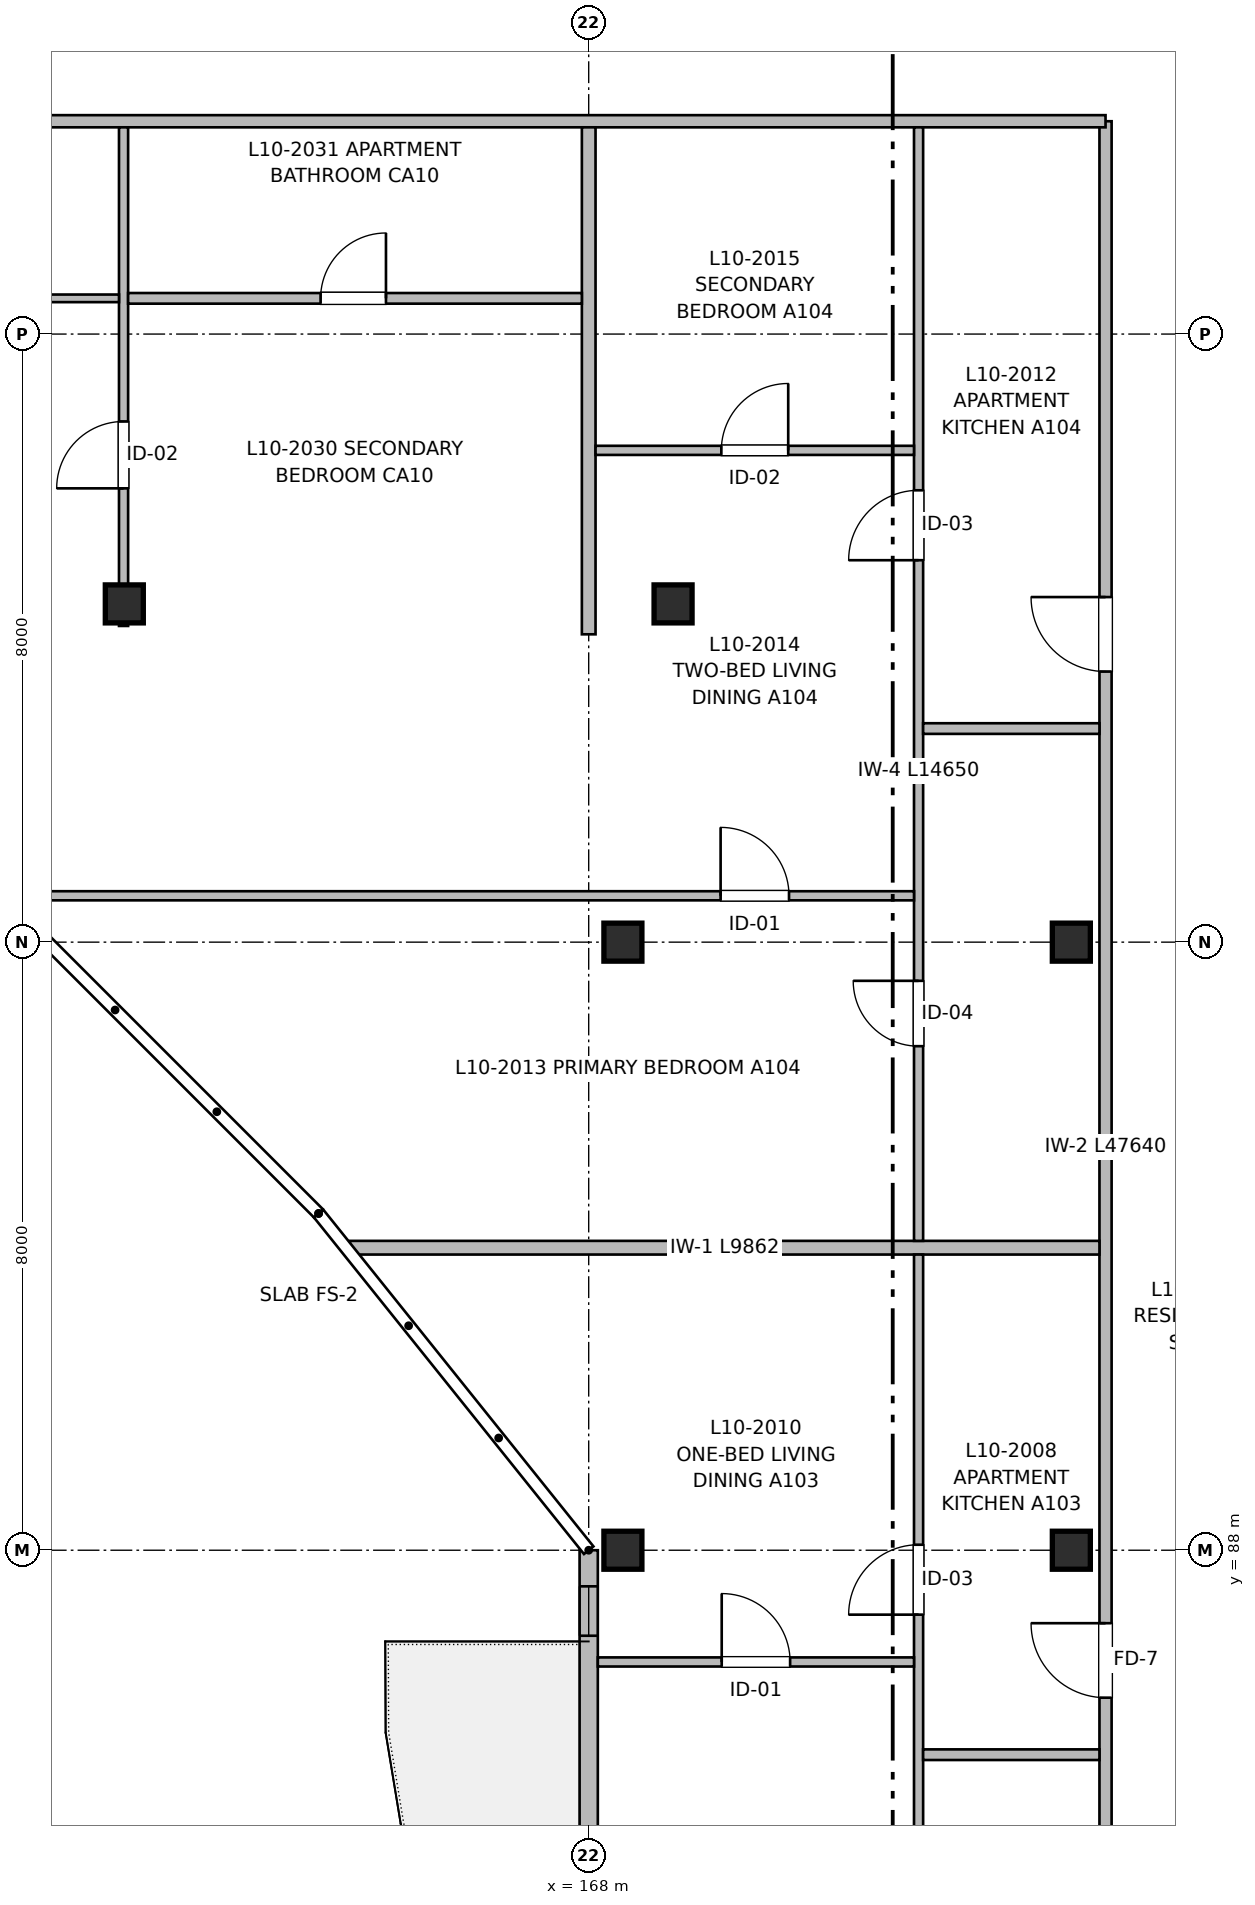
"""IFC4 building model, lengths in metres.
Left out: names, types, materials, properties, quantities, classifications, styles, units other than length and angle.
Written with IfcOpenShell. Run it as: python <this file> out.ifc"""

import sys

from ifc_helpers import new_model, si_unit, direction, frame, frame_2d, origin, origin_2d, place, context, subcontext, project, spatial, rectangle, extrude, element, fill, save


model = new_model("IFC4")
c1 = context("Model", 3, precision=1e-05, world=origin(), true_north=direction((0.0, 1.0)))
c2 = subcontext(c1, "Body", "Model", "MODEL_VIEW")
j1 = project(units=[si_unit("LENGTHUNIT", "METRE"), si_unit("PLANEANGLEUNIT", "RADIAN")], contexts=[c1])
p1 = place(None, origin())
s1 = spatial("IfcSite", under=j1, at=p1, CompositionType="ELEMENT")
p2 = place(p1, origin())
s2 = spatial("IfcBuilding", under=s1, at=p2, CompositionType="ELEMENT")
p3 = place(p2, frame((0.0, 0.0, 32.96)))
s3 = spatial("IfcBuildingStorey", under=s2, at=p3, CompositionType="ELEMENT", Elevation=32.96)
for number, where, z_axis, x_axis in (
    (1, (161.89, 100.45, 0.0), (0.0, 0.0, 1.0), (1.0, 0.0, 0.0)),
    (2, (168.45, 88.0, 0.0), (0.0, 0.0, 1.0), (1.0, 0.0, 0.0)),
    (3, (168.45, 96.0, 0.0), (0.0, 0.0, 1.0), (1.0, 0.0, 0.0)),
    (4, (169.11, 100.45, 0.0), (0.0, 0.0, 1.0), (1.0, 0.0, 0.0)),
    (5, (174.35, 88.0, 0.0), (0.0, 0.0, 1.0), (1.0, 0.0, 0.0)),
    (6, (174.35, 96.0, 0.0), (0.0, 0.0, 1.0), (1.0, 0.0, 0.0)),
):
    element("IfcColumn", number, at=place(p3, frame(where, z_axis=z_axis, x_axis=x_axis)), inside=s3, PredefinedType="COLUMN", context=c2, shape_type="SweptSolid", body=[
        extrude(rectangle(XDim=0.5, YDim=0.5, at=origin_2d()), origin(), (0.0, 0.0, 1.0), 3.2),
    ])
p4 = place(p3, frame((168.0, 59.0, 0.0), z_axis=(0.0, 0.0, 1.0), x_axis=(0.0, 1.0, 0.0)))
e7 = element("IfcWall", 7, at=p4, inside=s3, PredefinedType="SOLIDWALL", context=c2, shape_type="SweptSolid", body=[
    extrude(rectangle(XDim=29.0, YDim=0.24, at=frame_2d((14.5, 0.0))), origin(), (0.0, 0.0, 1.0), 2.98),
])
p5 = place(p4, frame((3.033, 0.0, 0.0)))
e8 = element("IfcOpeningElement", 8, at=p5, cuts=e7, PredefinedType="OPENING", context=c2, shape_type="SweptSolid", body=[
    extrude(rectangle(XDim=1.2, YDim=2.2, at=frame_2d((0.6, 1.1))), frame((0.0, 0.13, 0.0), z_axis=(0.0, -1.0, 0.0), x_axis=(1.0, 0.0, 0.0)), (0.0, 0.0, 1.0), 0.26),
])
p6 = place(p4, frame((6.133, 0.0, 0.82)))
e9 = element("IfcOpeningElement", 9, at=p6, cuts=e7, PredefinedType="OPENING", context=c2, shape_type="SweptSolid", body=[
    extrude(rectangle(XDim=1.5, YDim=1.4, at=frame_2d((0.75, 0.7))), frame((0.0, 0.13, 0.0), z_axis=(0.0, -1.0, 0.0), x_axis=(1.0, 0.0, 0.0)), (0.0, 0.0, 1.0), 0.26),
])
p7 = place(p4, frame((13.9, 0.0, 0.9)))
e10 = element("IfcOpeningElement", 10, at=p7, cuts=e7, PredefinedType="OPENING", context=c2, shape_type="SweptSolid", body=[
    extrude(rectangle(XDim=1.2, YDim=1.05, at=frame_2d((0.6, 0.525))), frame((0.0, 0.13, 0.0), z_axis=(0.0, -1.0, 0.0), x_axis=(1.0, 0.0, 0.0)), (0.0, 0.0, 1.0), 0.26),
])
p8 = place(p4, frame((23.842, 0.0, 0.9)))
e11 = element("IfcOpeningElement", 11, at=p8, cuts=e7, PredefinedType="OPENING", context=c2, shape_type="SweptSolid", body=[
    extrude(rectangle(XDim=0.65, YDim=0.95, at=frame_2d((0.325, 0.475))), frame((0.0, 0.13, 0.0), z_axis=(0.0, -1.0, 0.0), x_axis=(1.0, 0.0, 0.0)), (0.0, 0.0, 1.0), 0.26),
])
p9 = place(p4, frame((17.535, 0.0, 0.82)))
e12 = element("IfcOpeningElement", 12, at=p9, cuts=e7, PredefinedType="OPENING", context=c2, shape_type="SweptSolid", body=[
    extrude(rectangle(XDim=1.5, YDim=1.4, at=frame_2d((0.75, 0.7))), frame((0.0, 0.13, 0.0), z_axis=(0.0, -1.0, 0.0), x_axis=(1.0, 0.0, 0.0)), (0.0, 0.0, 1.0), 0.26),
])
p10 = place(p4, frame((27.875, 0.0, 0.9)))
e13 = element("IfcOpeningElement", 13, at=p10, cuts=e7, PredefinedType="OPENING", context=c2, shape_type="SweptSolid", body=[
    extrude(rectangle(XDim=0.65, YDim=0.95, at=frame_2d((0.325, 0.475))), frame((0.0, 0.13, 0.0), z_axis=(0.0, -1.0, 0.0), x_axis=(1.0, 0.0, 0.0)), (0.0, 0.0, 1.0), 0.26),
])
p11 = place(p3, frame((174.8, 59.16, 0.0), z_axis=(0.0, 0.0, 1.0), x_axis=(0.0, 1.0, 0.0)))
e14 = element("IfcWall", 14, at=p11, inside=s3, PredefinedType="PARTITIONING", context=c2, shape_type="SweptSolid", body=[
    extrude(rectangle(XDim=47.64, YDim=0.16, at=frame_2d((23.82, 0.0))), origin(), (0.0, 0.0, 1.0), 2.935),
])
p12 = place(p11, frame((5.7, 0.0, 0.0)))
e15 = element("IfcOpeningElement", 15, at=p12, cuts=e14, PredefinedType="OPENING", context=c2, shape_type="SweptSolid", body=[
    extrude(rectangle(XDim=0.98, YDim=2.15, at=frame_2d((0.49, 1.075))), frame((0.0, 0.09, 0.0), z_axis=(0.0, -1.0, 0.0), x_axis=(1.0, 0.0, 0.0)), (0.0, 0.0, 1.0), 0.18),
])
p13 = place(p11, frame((15.56, 0.0, 0.0)))
e16 = element("IfcOpeningElement", 16, at=p13, cuts=e14, PredefinedType="OPENING", context=c2, shape_type="SweptSolid", body=[
    extrude(rectangle(XDim=0.98, YDim=2.15, at=frame_2d((0.49, 1.075))), frame((0.0, 0.09, 0.0), z_axis=(0.0, -1.0, 0.0), x_axis=(1.0, 0.0, 0.0)), (0.0, 0.0, 1.0), 0.18),
])
p14 = place(p11, frame((26.9, 0.0, 0.0)))
e17 = element("IfcOpeningElement", 17, at=p14, cuts=e14, PredefinedType="OPENING", context=c2, shape_type="SweptSolid", body=[
    extrude(rectangle(XDim=0.98, YDim=2.15, at=frame_2d((0.49, 1.075))), frame((0.0, 0.09, 0.0), z_axis=(0.0, -1.0, 0.0), x_axis=(1.0, 0.0, 0.0)), (0.0, 0.0, 1.0), 0.18),
])
p15 = place(p11, frame((40.4, 0.0, 0.0)))
e18 = element("IfcOpeningElement", 18, at=p15, cuts=e14, PredefinedType="OPENING", context=c2, shape_type="SweptSolid", body=[
    extrude(rectangle(XDim=0.98, YDim=2.15, at=frame_2d((0.49, 1.075))), frame((0.0, 0.09, 0.0), z_axis=(0.0, -1.0, 0.0), x_axis=(1.0, 0.0, 0.0)), (0.0, 0.0, 1.0), 0.18),
])
p16 = place(p3, frame((147.16, 106.8, 0.0), z_axis=(0.0, 0.0, 1.0), x_axis=(1.0, 0.0, 0.0)))
e19 = element("IfcWall", 19, at=p16, inside=s3, PredefinedType="PARTITIONING", context=c2, shape_type="SweptSolid", body=[
    extrude(rectangle(XDim=27.64, YDim=0.16, at=frame_2d((13.82, 0.0))), origin(), (0.0, 0.0, 1.0), 2.935),
])
p17 = place(p16, frame((3.515, 0.0, 0.0)))
e20 = element("IfcOpeningElement", 20, at=p17, cuts=e19, PredefinedType="OPENING", context=c2, shape_type="SweptSolid", body=[
    extrude(rectangle(XDim=1.05, YDim=2.15, at=frame_2d((0.525, 1.075))), frame((0.0, 0.09, 0.0), z_axis=(0.0, -1.0, 0.0), x_axis=(1.0, 0.0, 0.0)), (0.0, 0.0, 1.0), 0.18),
])
p18 = place(p16, frame((10.69, 0.0, 0.0)))
e21 = element("IfcOpeningElement", 21, at=p18, cuts=e19, PredefinedType="OPENING", context=c2, shape_type="SweptSolid", body=[
    extrude(rectangle(XDim=0.98, YDim=2.15, at=frame_2d((0.49, 1.075))), frame((0.0, 0.09, 0.0), z_axis=(0.0, -1.0, 0.0), x_axis=(1.0, 0.0, 0.0)), (0.0, 0.0, 1.0), 0.18),
])
p19 = place(p3, frame((168.0, 100.05, 0.0), z_axis=(0.0, 0.0, 1.0), x_axis=(0.0, 1.0, 0.0)))
e22 = element("IfcWall", 22, at=p19, inside=s3, PredefinedType="PARTITIONING", context=c2, shape_type="SweptSolid", body=[
    extrude(rectangle(XDim=6.67, YDim=0.18, at=frame_2d((3.335, 0.0))), origin(), (0.0, 0.0, 1.0), 2.935),
])
p20 = place(p3, frame((164.858, 91.98, 0.0), z_axis=(0.0, 0.0, 1.0), x_axis=(1.0, 0.0, 0.0)))
e23 = element("IfcWall", 23, at=p20, inside=s3, PredefinedType="PARTITIONING", context=c2, shape_type="SweptSolid", body=[
    extrude(rectangle(XDim=9.862, YDim=0.18, at=frame_2d((4.931, 0.0))), origin(), (0.0, 0.0, 1.0), 2.935),
])
p21 = place(p3, frame((172.34, 79.7, 0.0), z_axis=(0.0, 0.0, 1.0), x_axis=(0.0, 1.0, 0.0)))
e24 = element("IfcWall", 24, at=p21, inside=s3, PredefinedType="PARTITIONING", context=c2, shape_type="SweptSolid", body=[
    extrude(rectangle(XDim=12.19, YDim=0.12, at=frame_2d((6.095, 0.0))), origin(), (0.0, 0.0, 1.0), 2.935),
])
p22 = place(p21, frame((2.132, 0.0, 0.0)))
e25 = element("IfcOpeningElement", 25, at=p22, cuts=e24, PredefinedType="OPENING", context=c2, shape_type="SweptSolid", body=[
    extrude(rectangle(XDim=0.86, YDim=2.1, at=frame_2d((0.43, 1.05))), frame((0.0, 0.07, 0.0), z_axis=(0.0, -1.0, 0.0), x_axis=(1.0, 0.0, 0.0)), (0.0, 0.0, 1.0), 0.14),
])
p23 = place(p21, frame((7.452, 0.0, 0.0)))
e26 = element("IfcOpeningElement", 26, at=p23, cuts=e24, PredefinedType="OPENING", context=c2, shape_type="SweptSolid", body=[
    extrude(rectangle(XDim=0.92, YDim=2.1, at=frame_2d((0.46, 1.05))), frame((0.0, 0.07, 0.0), z_axis=(0.0, -1.0, 0.0), x_axis=(1.0, 0.0, 0.0)), (0.0, 0.0, 1.0), 0.14),
])
p24 = place(p3, frame((172.4, 85.31, 0.0), z_axis=(0.0, 0.0, 1.0), x_axis=(1.0, 0.0, 0.0)))
e27 = element("IfcWall", 27, at=p24, inside=s3, PredefinedType="PARTITIONING", context=c2, shape_type="SweptSolid", body=[
    extrude(rectangle(XDim=2.32, YDim=0.14, at=frame_2d((1.16, 0.0))), origin(), (0.0, 0.0, 1.0), 2.935),
])
p25 = place(p3, frame((168.12, 86.53, 0.0), z_axis=(0.0, 0.0, 1.0), x_axis=(1.0, 0.0, 0.0)))
e28 = element("IfcWall", 28, at=p25, inside=s3, PredefinedType="PARTITIONING", context=c2, shape_type="SweptSolid", body=[
    extrude(rectangle(XDim=4.16, YDim=0.12, at=frame_2d((2.08, 0.0))), origin(), (0.0, 0.0, 1.0), 2.935),
])
p26 = place(p25, frame((1.63, 0.0, 0.0)))
e29 = element("IfcOpeningElement", 29, at=p26, cuts=e28, PredefinedType="OPENING", context=c2, shape_type="SweptSolid", body=[
    extrude(rectangle(XDim=0.9, YDim=2.1, at=frame_2d((0.45, 1.05))), frame((0.0, 0.07, 0.0), z_axis=(0.0, -1.0, 0.0), x_axis=(1.0, 0.0, 0.0)), (0.0, 0.0, 1.0), 0.14),
])
p27 = place(p3, frame((172.34, 92.07, 0.0), z_axis=(0.0, 0.0, 1.0), x_axis=(0.0, 1.0, 0.0)))
e30 = element("IfcWall", 30, at=p27, inside=s3, PredefinedType="PARTITIONING", context=c2, shape_type="SweptSolid", body=[
    extrude(rectangle(XDim=14.65, YDim=0.12, at=frame_2d((7.325, 0.0))), origin(), (0.0, 0.0, 1.0), 2.935),
])
p28 = place(p27, frame((2.561, 0.0, 0.0)))
e31 = element("IfcOpeningElement", 31, at=p28, cuts=e30, PredefinedType="OPENING", context=c2, shape_type="SweptSolid", body=[
    extrude(rectangle(XDim=0.86, YDim=2.1, at=frame_2d((0.43, 1.05))), frame((0.0, 0.07, 0.0), z_axis=(0.0, -1.0, 0.0), x_axis=(1.0, 0.0, 0.0)), (0.0, 0.0, 1.0), 0.14),
])
p29 = place(p27, frame((8.955, 0.0, 0.0)))
e32 = element("IfcOpeningElement", 32, at=p29, cuts=e30, PredefinedType="OPENING", context=c2, shape_type="SweptSolid", body=[
    extrude(rectangle(XDim=0.92, YDim=2.1, at=frame_2d((0.46, 1.05))), frame((0.0, 0.07, 0.0), z_axis=(0.0, -1.0, 0.0), x_axis=(1.0, 0.0, 0.0)), (0.0, 0.0, 1.0), 0.14),
])
p30 = place(p3, frame((172.4, 98.81, 0.0), z_axis=(0.0, 0.0, 1.0), x_axis=(1.0, 0.0, 0.0)))
e33 = element("IfcWall", 33, at=p30, inside=s3, PredefinedType="PARTITIONING", context=c2, shape_type="SweptSolid", body=[
    extrude(rectangle(XDim=2.32, YDim=0.14, at=frame_2d((1.16, 0.0))), origin(), (0.0, 0.0, 1.0), 2.935),
])
p31 = place(p3, frame((160.29, 96.61, 0.0), z_axis=(0.0, 0.0, 1.0), x_axis=(1.0, 0.0, 0.0)))
e34 = element("IfcWall", 34, at=p31, inside=s3, PredefinedType="PARTITIONING", context=c2, shape_type="SweptSolid", body=[
    extrude(rectangle(XDim=11.99, YDim=0.12, at=frame_2d((5.995, 0.0))), origin(), (0.0, 0.0, 1.0), 2.935),
])
p32 = place(p31, frame((9.446, 0.0, 0.0)))
e35 = element("IfcOpeningElement", 35, at=p32, cuts=e34, PredefinedType="OPENING", context=c2, shape_type="SweptSolid", body=[
    extrude(rectangle(XDim=0.9, YDim=2.1, at=frame_2d((0.45, 1.05))), frame((0.0, 0.07, 0.0), z_axis=(0.0, -1.0, 0.0), x_axis=(1.0, 0.0, 0.0)), (0.0, 0.0, 1.0), 0.14),
])
p33 = place(p3, frame((168.09, 102.47, 0.0), z_axis=(0.0, 0.0, 1.0), x_axis=(1.0, 0.0, 0.0)))
e36 = element("IfcWall", 36, at=p33, inside=s3, PredefinedType="PARTITIONING", context=c2, shape_type="SweptSolid", body=[
    extrude(rectangle(XDim=4.19, YDim=0.12, at=frame_2d((2.095, 0.0))), origin(), (0.0, 0.0, 1.0), 2.935),
])
p34 = place(p33, frame((1.655, 0.0, 0.0)))
e37 = element("IfcOpeningElement", 37, at=p34, cuts=e36, PredefinedType="OPENING", context=c2, shape_type="SweptSolid", body=[
    extrude(rectangle(XDim=0.88, YDim=2.1, at=frame_2d((0.44, 1.05))), frame((0.0, 0.07, 0.0), z_axis=(0.0, -1.0, 0.0), x_axis=(1.0, 0.0, 0.0)), (0.0, 0.0, 1.0), 0.14),
])
p35 = place(p3, frame((161.88, 100.16, 0.0), z_axis=(0.0, 0.0, 1.0), x_axis=(0.0, 1.0, 0.0)))
e38 = element("IfcWall", 38, at=p35, inside=s3, PredefinedType="PARTITIONING", context=c2, shape_type="SweptSolid", body=[
    extrude(rectangle(XDim=6.56, YDim=0.12, at=frame_2d((3.28, 0.0))), origin(), (0.0, 0.0, 1.0), 2.68),
])
p36 = place(p35, frame((1.81, 0.0, 0.0)))
e39 = element("IfcOpeningElement", 39, at=p36, cuts=e38, PredefinedType="OPENING", context=c2, shape_type="SweptSolid", body=[
    extrude(rectangle(XDim=0.88, YDim=2.1, at=frame_2d((0.44, 1.05))), frame((0.0, 0.07, 0.0), z_axis=(0.0, -1.0, 0.0), x_axis=(1.0, 0.0, 0.0)), (0.0, 0.0, 1.0), 0.14),
])
p37 = place(p3, frame((161.94, 104.47, 0.0), z_axis=(0.0, 0.0, 1.0), x_axis=(1.0, 0.0, 0.0)))
e40 = element("IfcWall", 40, at=p37, inside=s3, PredefinedType="PARTITIONING", context=c2, shape_type="SweptSolid", body=[
    extrude(rectangle(XDim=5.97, YDim=0.14, at=frame_2d((2.985, 0.0))), origin(), (0.0, 0.0, 1.0), 2.935),
])
p38 = place(p37, frame((2.533, 0.0, 0.0)))
e41 = element("IfcOpeningElement", 41, at=p38, cuts=e40, PredefinedType="OPENING", context=c2, shape_type="SweptSolid", body=[
    extrude(rectangle(XDim=0.86, YDim=2.1, at=frame_2d((0.43, 1.05))), frame((0.0, 0.08, 0.0), z_axis=(0.0, -1.0, 0.0), x_axis=(1.0, 0.0, 0.0)), (0.0, 0.0, 1.0), 0.16),
])
p39 = place(p3, frame((154.8, 104.47, 0.0), z_axis=(0.0, 0.0, 1.0), x_axis=(1.0, 0.0, 0.0)))
e42 = element("IfcWall", 42, at=p39, inside=s3, PredefinedType="PARTITIONING", context=c2, shape_type="SweptSolid", body=[
    extrude(rectangle(XDim=7.02, YDim=0.1, at=frame_2d((3.51, 0.0))), origin(), (0.0, 0.0, 1.0), 2.935),
])
p40 = place(p39, frame((2.974, 0.0, 0.0)))
e43 = element("IfcOpeningElement", 43, at=p40, cuts=e42, PredefinedType="OPENING", context=c2, shape_type="SweptSolid", body=[
    extrude(rectangle(XDim=0.92, YDim=2.1, at=frame_2d((0.46, 1.05))), frame((0.0, 0.06, 0.0), z_axis=(0.0, -1.0, 0.0), x_axis=(1.0, 0.0, 0.0)), (0.0, 0.0, 1.0), 0.12),
])
p41 = place(p23, origin())
e44 = element("IfcDoor", 44, at=p41, inside=s3, OperationType="SINGLE_SWING_LEFT", PredefinedType="DOOR", context=c2, shape_type="SweptSolid", body=[
    extrude(rectangle(XDim=0.92, YDim=2.1, at=frame_2d((0.46, 1.05))), frame((0.0, 0.025, 0.0), z_axis=(0.0, -1.0, 0.0), x_axis=(1.0, 0.0, 0.0)), (0.0, 0.0, 1.0), 0.05),
])
fill(e26, e44)
p42 = place(p14, origin())
e45 = element("IfcDoor", 45, at=p42, inside=s3, OperationType="SINGLE_SWING_RIGHT", PredefinedType="DOOR", context=c2, shape_type="SweptSolid", body=[
    extrude(rectangle(XDim=0.98, YDim=2.15, at=frame_2d((0.49, 1.075))), frame((0.0, 0.025, 0.0), z_axis=(0.0, -1.0, 0.0), x_axis=(1.0, 0.0, 0.0)), (0.0, 0.0, 1.0), 0.05),
])
fill(e17, e45)
p43 = place(p26, origin())
e46 = element("IfcDoor", 46, at=p43, inside=s3, OperationType="SINGLE_SWING_LEFT", PredefinedType="DOOR", context=c2, shape_type="SweptSolid", body=[
    extrude(rectangle(XDim=0.9, YDim=2.1, at=frame_2d((0.45, 1.05))), frame((0.0, 0.025, 0.0), z_axis=(0.0, -1.0, 0.0), x_axis=(1.0, 0.0, 0.0)), (0.0, 0.0, 1.0), 0.05),
])
fill(e29, e46)
p44 = place(p28, origin())
e47 = element("IfcDoor", 47, at=p44, inside=s3, OperationType="SINGLE_SWING_RIGHT", PredefinedType="DOOR", context=c2, shape_type="SweptSolid", body=[
    extrude(rectangle(XDim=0.86, YDim=2.1, at=frame_2d((0.43, 1.05))), frame((0.0, 0.025, 0.0), z_axis=(0.0, -1.0, 0.0), x_axis=(1.0, 0.0, 0.0)), (0.0, 0.0, 1.0), 0.05),
])
fill(e31, e47)
p45 = place(p29, origin())
e48 = element("IfcDoor", 48, at=p45, inside=s3, OperationType="SINGLE_SWING_LEFT", PredefinedType="DOOR", context=c2, shape_type="SweptSolid", body=[
    extrude(rectangle(XDim=0.92, YDim=2.1, at=frame_2d((0.46, 1.05))), frame((0.0, 0.025, 0.0), z_axis=(0.0, -1.0, 0.0), x_axis=(1.0, 0.0, 0.0)), (0.0, 0.0, 1.0), 0.05),
])
fill(e32, e48)
p46 = place(p15, origin())
e49 = element("IfcDoor", 49, at=p46, inside=s3, OperationType="SINGLE_SWING_RIGHT", PredefinedType="DOOR", context=c2, shape_type="SweptSolid", body=[
    extrude(rectangle(XDim=0.98, YDim=2.15, at=frame_2d((0.49, 1.075))), frame((0.0, 0.025, 0.0), z_axis=(0.0, -1.0, 0.0), x_axis=(1.0, 0.0, 0.0)), (0.0, 0.0, 1.0), 0.05),
])
fill(e18, e49)
p47 = place(p32, origin())
e50 = element("IfcDoor", 50, at=p47, inside=s3, OperationType="SINGLE_SWING_LEFT", PredefinedType="DOOR", context=c2, shape_type="SweptSolid", body=[
    extrude(rectangle(XDim=0.9, YDim=2.1, at=frame_2d((0.45, 1.05))), frame((0.0, 0.025, 0.0), z_axis=(0.0, -1.0, 0.0), x_axis=(1.0, 0.0, 0.0)), (0.0, 0.0, 1.0), 0.05),
])
fill(e35, e50)
p48 = place(p34, origin())
e51 = element("IfcDoor", 51, at=p48, inside=s3, OperationType="SINGLE_SWING_RIGHT", PredefinedType="DOOR", context=c2, shape_type="SweptSolid", body=[
    extrude(rectangle(XDim=0.88, YDim=2.1, at=frame_2d((0.44, 1.05))), frame((0.0, 0.025, 0.0), z_axis=(0.0, -1.0, 0.0), x_axis=(1.0, 0.0, 0.0)), (0.0, 0.0, 1.0), 0.05),
])
fill(e37, e51)
p49 = place(p36, origin())
e52 = element("IfcDoor", 52, at=p49, inside=s3, OperationType="SINGLE_SWING_LEFT", PredefinedType="DOOR", context=c2, shape_type="SweptSolid", body=[
    extrude(rectangle(XDim=0.88, YDim=2.1, at=frame_2d((0.44, 1.05))), frame((0.0, 0.025, 0.0), z_axis=(0.0, -1.0, 0.0), x_axis=(1.0, 0.0, 0.0)), (0.0, 0.0, 1.0), 0.05),
])
fill(e39, e52)
p50 = place(p38, origin())
e53 = element("IfcDoor", 53, at=p50, inside=s3, OperationType="SINGLE_SWING_RIGHT", PredefinedType="DOOR", context=c2, shape_type="SweptSolid", body=[
    extrude(rectangle(XDim=0.86, YDim=2.1, at=frame_2d((0.43, 1.05))), frame((0.0, 0.025, 0.0), z_axis=(0.0, -1.0, 0.0), x_axis=(1.0, 0.0, 0.0)), (0.0, 0.0, 1.0), 0.05),
])
fill(e41, e53)
p51 = place(p10, origin())
e54 = element("IfcWindow", 54, at=p51, inside=s3, PartitioningType="SINGLE_PANEL", PredefinedType="WINDOW", context=c2, shape_type="SweptSolid", body=[
    extrude(rectangle(XDim=0.65, YDim=0.95, at=frame_2d((0.325, 0.475))), frame((0.0, 0.03, 0.0), z_axis=(0.0, -1.0, 0.0), x_axis=(1.0, 0.0, 0.0)), (0.0, 0.0, 1.0), 0.06),
])
fill(e13, e54)
save(model, sys.argv[1])
